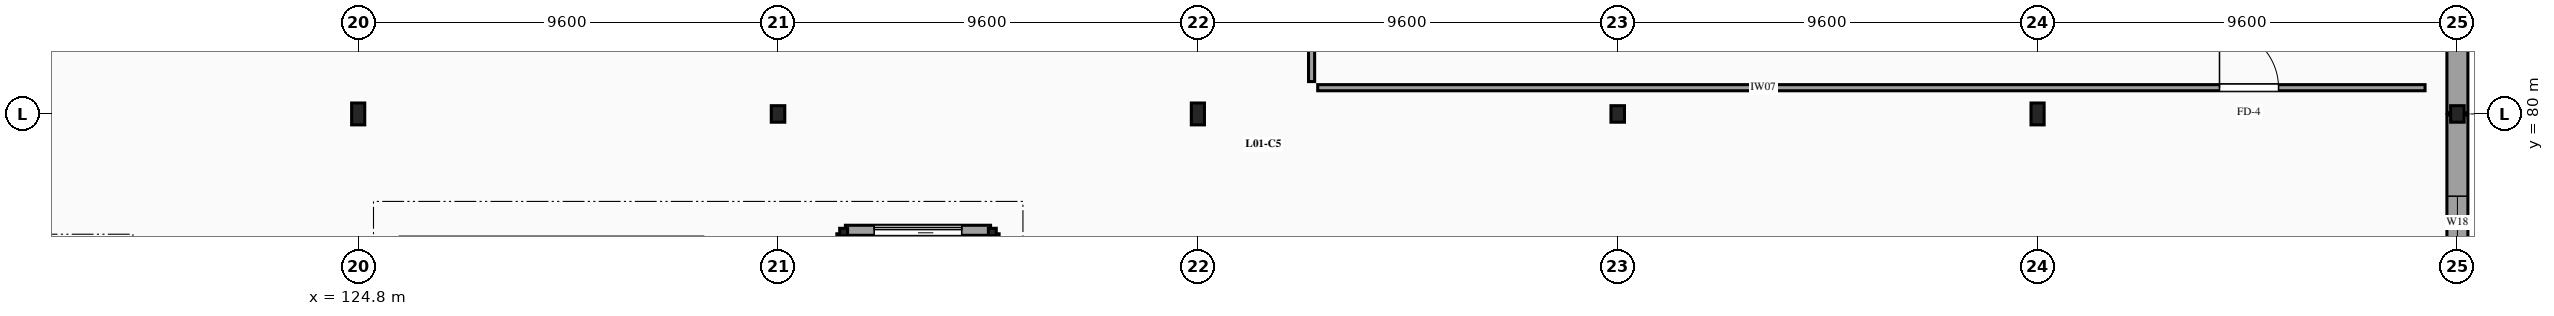
"""IFC4 building model, lengths in metres.
Left out: names, types, materials, properties, quantities, classifications, styles, units other than length and angle.
Written with IfcOpenShell. Run it as: python <this file> out.ifc"""

import sys

from ifc_helpers import new_model, si_unit, direction, frame, frame_2d, origin, origin_2d, place, context, subcontext, project, spatial, rectangle, i_section, extrude, element, fill, save


model = new_model("IFC4")
c1 = context("Model", 3, precision=1e-05, world=origin(), true_north=direction((0.0, 1.0)))
c2 = subcontext(c1, "Body", "Model", "MODEL_VIEW")
j1 = project(units=[si_unit("LENGTHUNIT", "METRE"), si_unit("PLANEANGLEUNIT", "RADIAN")], contexts=[c1])
p1 = place(None, origin())
s1 = spatial("IfcSite", under=j1, at=p1, CompositionType="ELEMENT")
p2 = place(p1, origin())
s2 = spatial("IfcBuilding", under=s1, at=p2, CompositionType="ELEMENT")
p3 = place(p2, frame((0.0, 0.0, 4.5)))
s3 = spatial("IfcBuildingStorey", under=s2, at=p3, CompositionType="ELEMENT", Elevation=4.5)
p4 = place(p3, frame((124.8, 80.0, -0.26), z_axis=(0.0, 0.0, 1.0), x_axis=(1.0, 0.0, 0.0)))
e1 = element("IfcColumn", 1, at=p4, inside=s3, PredefinedType="COLUMN", context=c2, shape_type="SweptSolid", body=[
    extrude(i_section(OverallWidth=0.3, OverallDepth=0.5, WebThickness=0.014, FlangeThickness=0.028, FilletRadius=0.027, at=origin_2d()), origin(), (0.0, 0.0, 1.0), 4.2),
])
p5 = place(p3, frame((134.4, 80.0, -0.26), z_axis=(0.0, 0.0, 1.0), x_axis=(1.0, 0.0, 0.0)))
e2 = element("IfcColumn", 2, at=p5, inside=s3, PredefinedType="COLUMN", context=c2, shape_type="SweptSolid", body=[
    extrude(i_section(OverallWidth=0.309, OverallDepth=0.377, WebThickness=0.021, FlangeThickness=0.04, FilletRadius=0.027, at=origin_2d()), origin(), (0.0, 0.0, 1.0), 4.2),
])
p6 = place(p3, frame((144.0, 80.0, -0.26), z_axis=(0.0, 0.0, 1.0), x_axis=(1.0, 0.0, 0.0)))
e3 = element("IfcColumn", 3, at=p6, inside=s3, PredefinedType="COLUMN", context=c2, shape_type="SweptSolid", body=[
    extrude(i_section(OverallWidth=0.3, OverallDepth=0.5, WebThickness=0.014, FlangeThickness=0.028, FilletRadius=0.027, at=origin_2d()), origin(), (0.0, 0.0, 1.0), 4.2),
])
p7 = place(p3, frame((153.6, 80.0, -0.26), z_axis=(0.0, 0.0, 1.0), x_axis=(1.0, 0.0, 0.0)))
e4 = element("IfcColumn", 4, at=p7, inside=s3, PredefinedType="COLUMN", context=c2, shape_type="SweptSolid", body=[
    extrude(i_section(OverallWidth=0.309, OverallDepth=0.377, WebThickness=0.021, FlangeThickness=0.04, FilletRadius=0.027, at=origin_2d()), origin(), (0.0, 0.0, 1.0), 4.2),
])
p8 = place(p3, frame((163.2, 80.0, -0.26), z_axis=(0.0, 0.0, 1.0), x_axis=(1.0, 0.0, 0.0)))
e5 = element("IfcColumn", 5, at=p8, inside=s3, PredefinedType="COLUMN", context=c2, shape_type="SweptSolid", body=[
    extrude(i_section(OverallWidth=0.3, OverallDepth=0.5, WebThickness=0.014, FlangeThickness=0.028, FilletRadius=0.027, at=origin_2d()), origin(), (0.0, 0.0, 1.0), 4.2),
])
p9 = place(p3, frame((172.8, 80.0, -0.26), z_axis=(0.0, 0.0, 1.0), x_axis=(1.0, 0.0, 0.0)))
e6 = element("IfcColumn", 6, at=p9, inside=s3, PredefinedType="COLUMN", context=c2, shape_type="SweptSolid", body=[
    extrude(i_section(OverallWidth=0.309, OverallDepth=0.377, WebThickness=0.021, FlangeThickness=0.04, FilletRadius=0.027, at=origin_2d()), origin(), (0.0, 0.0, 1.0), 4.2),
])
for number, where, z_axis, x_axis in (
    (7, (139.3, 77.3, 0.0), (0.0, 0.0, 1.0), (1.0, 0.0, 0.0)),
    (8, (135.9, 77.3, 0.0), (0.0, 0.0, 1.0), (1.0, 0.0, 0.0)),
):
    element("IfcColumn", number, at=place(p3, frame(where, z_axis=z_axis, x_axis=x_axis)), inside=s3, PredefinedType="COLUMN", context=c2, shape_type="SweptSolid", body=[
        extrude(i_section(OverallWidth=0.18, OverallDepth=0.171, WebThickness=0.006, FlangeThickness=0.01, FilletRadius=0.015, at=origin_2d()), origin(), (0.0, 0.0, 1.0), 4.2),
    ])
p10 = place(p3, frame((172.8, 72.02, 0.0), z_axis=(0.0, 0.0, 1.0), x_axis=(0.0, 1.0, 0.0)))
e9 = element("IfcWall", 9, at=p10, inside=s3, PredefinedType="SOLIDWALL", context=c2, shape_type="SweptSolid", body=[
    extrude(rectangle(XDim=7.96, YDim=0.48, at=frame_2d((3.98, 0.0))), origin(), (0.0, 0.0, 1.0), 3.26),
])
p11 = place(p10, frame((4.9, 0.0, 0.9)))
e10 = element("IfcOpeningElement", 10, at=p11, cuts=e9, PredefinedType="OPENING", context=c2, shape_type="SweptSolid", body=[
    extrude(rectangle(XDim=1.2, YDim=2.0, at=frame_2d((0.6, 1.0))), frame((0.0, 0.25, 0.0), z_axis=(0.0, -1.0, 0.0), x_axis=(1.0, 0.0, 0.0)), (0.0, 0.0, 1.0), 0.5),
])
p12 = place(p3, frame((172.8, 80.02, 0.0), z_axis=(0.0, 0.0, 1.0), x_axis=(0.0, 1.0, 0.0)))
e11 = element("IfcWall", 11, at=p12, inside=s3, PredefinedType="SOLIDWALL", context=c2, shape_type="SweptSolid", body=[
    extrude(rectangle(XDim=7.96, YDim=0.48, at=frame_2d((3.98, 0.0))), origin(), (0.0, 0.0, 1.0), 3.26),
])
p13 = place(p12, frame((4.9, 0.0, 0.9)))
e12 = element("IfcOpeningElement", 12, at=p13, cuts=e11, PredefinedType="OPENING", context=c2, shape_type="SweptSolid", body=[
    extrude(rectangle(XDim=1.2, YDim=1.8, at=frame_2d((0.6, 0.9))), frame((0.0, 0.25, 0.0), z_axis=(0.0, -1.0, 0.0), x_axis=(1.0, 0.0, 0.0)), (0.0, 0.0, 1.0), 0.5),
])
p14 = place(p3, frame((135.94, 77.34, 0.0), z_axis=(0.0, 0.0, 1.0), x_axis=(1.0, 0.0, 0.0)))
e13 = element("IfcWall", 13, at=p14, inside=s3, PredefinedType="SOLIDWALL", context=c2, shape_type="SweptSolid", body=[
    extrude(rectangle(XDim=3.32, YDim=0.23, at=frame_2d((1.66, 0.0))), origin(), (0.0, 0.0, 1.0), 3.1),
])
p15 = place(p14, frame((0.66, 0.0, 0.0)))
e14 = element("IfcOpeningElement", 14, at=p15, cuts=e13, PredefinedType="OPENING", context=c2, shape_type="SweptSolid", body=[
    extrude(rectangle(XDim=2.0, YDim=2.5, at=frame_2d((1.0, 1.25))), frame((0.0, 0.125, 0.0), z_axis=(0.0, -1.0, 0.0), x_axis=(1.0, 0.0, 0.0)), (0.0, 0.0, 1.0), 0.25),
])
for number, where, z_axis, x_axis in (
    (15, (135.86, 73.14, 0.0), (0.0, 0.0, 1.0), (0.0, 1.0, 0.0)),
    (16, (139.34, 73.14, 0.0), (0.0, 0.0, 1.0), (0.0, 1.0, 0.0)),
):
    element("IfcWall", number, at=place(p3, frame(where, z_axis=z_axis, x_axis=x_axis)), inside=s3, PredefinedType="SOLIDWALL", context=c2, shape_type="SweptSolid", body=[
        extrude(rectangle(XDim=4.12, YDim=0.23, at=frame_2d((2.06, 0.0))), origin(), (0.0, 0.0, 1.0), 3.1),
    ])
p16 = place(p3, frame((146.74, 80.6, 0.0), z_axis=(0.0, 0.0, 1.0), x_axis=(1.0, 0.0, 0.0)))
e17 = element("IfcWall", 17, at=p16, inside=s3, PredefinedType="PARTITIONING", context=c2, shape_type="SweptSolid", body=[
    extrude(rectangle(XDim=25.32, YDim=0.14, at=frame_2d((12.66, 0.0))), origin(), (0.0, 0.0, 1.0), 3.1),
])
p17 = place(p16, frame((20.62, 0.0, 0.0)))
e18 = element("IfcOpeningElement", 18, at=p17, cuts=e17, PredefinedType="OPENING", context=c2, shape_type="SweptSolid", body=[
    extrude(rectangle(XDim=1.35, YDim=2.2, at=frame_2d((0.675, 1.1))), frame((0.0, 0.08, 0.0), z_axis=(0.0, -1.0, 0.0), x_axis=(1.0, 0.0, 0.0)), (0.0, 0.0, 1.0), 0.16),
])
p18 = place(p3, frame((146.6, 80.74, 0.0), z_axis=(0.0, 0.0, 1.0), x_axis=(0.0, 1.0, 0.0)))
e19 = element("IfcWall", 19, at=p18, inside=s3, PredefinedType="PARTITIONING", context=c2, shape_type="SweptSolid", body=[
    extrude(rectangle(XDim=15.09, YDim=0.14, at=frame_2d((7.545, 0.0))), origin(), (0.0, 0.0, 1.0), 3.1),
])
p19 = place(p11, origin())
e20 = element("IfcWindow", 20, at=p19, inside=s3, PartitioningType="SINGLE_PANEL", PredefinedType="WINDOW", context=c2, shape_type="SweptSolid", body=[
    extrude(rectangle(XDim=1.2, YDim=2.0, at=frame_2d((0.6, 1.0))), frame((0.0, 0.03, 0.0), z_axis=(0.0, -1.0, 0.0), x_axis=(1.0, 0.0, 0.0)), (0.0, 0.0, 1.0), 0.06),
])
fill(e10, e20)
p20 = place(p15, origin())
e21 = element("IfcDoor", 21, at=p20, inside=s3, OperationType="SLIDING_TO_RIGHT", PredefinedType="DOOR", context=c2, shape_type="SweptSolid", body=[
    extrude(rectangle(XDim=2.0, YDim=2.5, at=frame_2d((1.0, 1.25))), frame((0.0, 0.025, 0.0), z_axis=(0.0, -1.0, 0.0), x_axis=(1.0, 0.0, 0.0)), (0.0, 0.0, 1.0), 0.05),
])
fill(e14, e21)
p21 = place(p17, origin())
e22 = element("IfcDoor", 22, at=p21, inside=s3, OperationType="SINGLE_SWING_LEFT", PredefinedType="DOOR", context=c2, shape_type="SweptSolid", body=[
    extrude(rectangle(XDim=1.35, YDim=2.2, at=frame_2d((0.675, 1.1))), frame((0.0, 0.025, 0.0), z_axis=(0.0, -1.0, 0.0), x_axis=(1.0, 0.0, 0.0)), (0.0, 0.0, 1.0), 0.05),
])
fill(e18, e22)
save(model, sys.argv[1])
